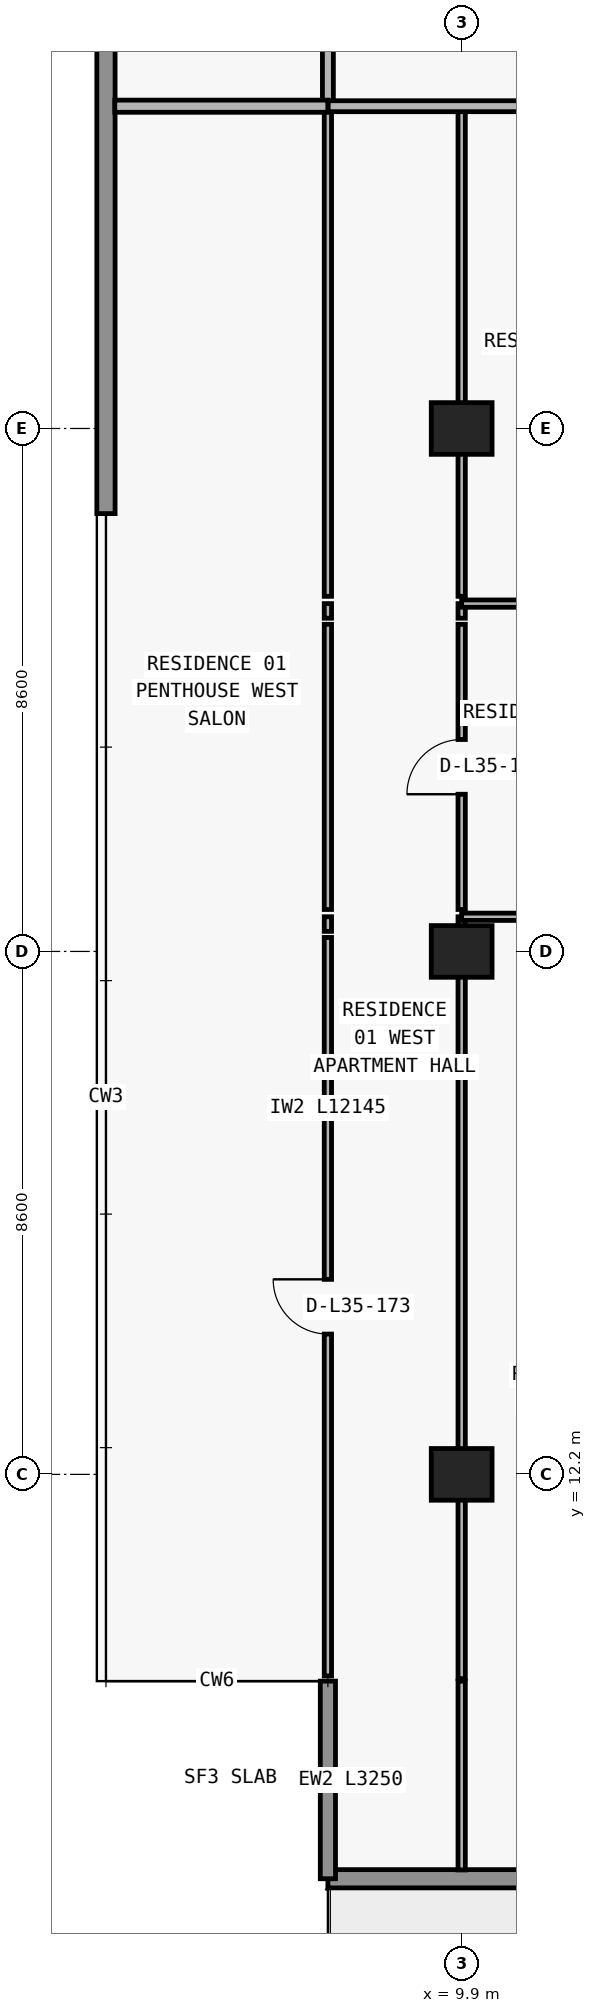
"""IFC4 building model, lengths in metres.
Left out: names, types, materials, properties, quantities, classifications, styles, units other than length and angle.
Written with IfcOpenShell. Run it as: python <this file> out.ifc"""

import sys

from ifc_helpers import new_model, si_unit, direction, frame, frame_2d, origin, origin_2d, place, context, subcontext, project, spatial, rectangle, extrude, element, fill, save


model = new_model("IFC4")
c1 = context("Model", 3, precision=1e-05, world=origin(), true_north=direction((0.0, 1.0)))
c2 = subcontext(c1, "Body", "Model", "MODEL_VIEW")
j1 = project(units=[si_unit("LENGTHUNIT", "METRE"), si_unit("PLANEANGLEUNIT", "RADIAN")], contexts=[c1])
p1 = place(None, origin())
s1 = spatial("IfcSite", under=j1, at=p1, CompositionType="ELEMENT")
p2 = place(p1, origin())
s2 = spatial("IfcBuilding", under=s1, at=p2, CompositionType="ELEMENT")
p3 = place(p2, frame((0.0, 0.0, 129.0)))
s3 = spatial("IfcBuildingStorey", under=s2, at=p3, CompositionType="ELEMENT", Elevation=129.0)
for number, where, z_axis, x_axis in (
    (1, (9.9, 12.2, 0.0), (0.0, 0.0, 1.0), (1.0, 0.0, 0.0)),
    (2, (9.9, 20.8, 0.0), (0.0, 0.0, 1.0), (1.0, 0.0, 0.0)),
    (3, (9.9, 29.4, 0.0), (0.0, 0.0, 1.0), (1.0, 0.0, 0.0)),
):
    element("IfcColumn", number, at=place(p3, frame(where, z_axis=z_axis, x_axis=x_axis)), inside=s3, PredefinedType="COLUMN", context=c2, shape_type="SweptSolid", body=[
        extrude(rectangle(XDim=1.0, YDim=0.85, at=origin_2d()), origin(), (0.0, 0.0, 1.0), 3.05),
    ])
p4 = place(p3, frame((70.1, 5.55, 0.0), z_axis=(0.0, 0.0, 1.0), x_axis=(-1.0, 0.0, 0.0)))
e4 = element("IfcWall", 4, at=p4, inside=s3, PredefinedType="STANDARD", context=c2, shape_type="SweptSolid", body=[
    extrude(rectangle(XDim=62.4, YDim=0.3, at=frame_2d((31.2, 0.0))), origin(), (0.0, 0.0, 1.0), 3.05),
])
p5 = place(p4, frame((57.226, 0.0, 0.0)))
e5 = element("IfcOpeningElement", 5, at=p5, cuts=e4, PredefinedType="OPENING", context=c2, shape_type="SweptSolid", body=[
    extrude(rectangle(XDim=2.0, YDim=2.3, at=frame_2d((1.0, 1.15))), frame((0.0, 0.16, 0.0), z_axis=(0.0, -1.0, 0.0), x_axis=(1.0, 0.0, 0.0)), (0.0, 0.0, 1.0), 0.32),
])
p6 = place(p4, frame((52.926, 0.0, 0.85)))
e6 = element("IfcOpeningElement", 6, at=p6, cuts=e4, PredefinedType="OPENING", context=c2, shape_type="SweptSolid", body=[
    extrude(rectangle(XDim=2.2, YDim=1.55, at=frame_2d((1.1, 0.775))), frame((0.0, 0.16, 0.0), z_axis=(0.0, -1.0, 0.0), x_axis=(1.0, 0.0, 0.0)), (0.0, 0.0, 1.0), 0.32),
])
p7 = place(p4, frame((48.49, 0.0, 0.0)))
e7 = element("IfcOpeningElement", 7, at=p7, cuts=e4, PredefinedType="OPENING", context=c2, shape_type="SweptSolid", body=[
    extrude(rectangle(XDim=2.0, YDim=2.3, at=frame_2d((1.0, 1.15))), frame((0.0, 0.16, 0.0), z_axis=(0.0, -1.0, 0.0), x_axis=(1.0, 0.0, 0.0)), (0.0, 0.0, 1.0), 0.32),
])
p8 = place(p4, frame((44.39, 0.0, 0.85)))
e8 = element("IfcOpeningElement", 8, at=p8, cuts=e4, PredefinedType="OPENING", context=c2, shape_type="SweptSolid", body=[
    extrude(rectangle(XDim=1.8, YDim=1.55, at=frame_2d((0.9, 0.775))), frame((0.0, 0.16, 0.0), z_axis=(0.0, -1.0, 0.0), x_axis=(1.0, 0.0, 0.0)), (0.0, 0.0, 1.0), 0.32),
])
p9 = place(p4, frame((40.426, 0.0, 0.0)))
e9 = element("IfcOpeningElement", 9, at=p9, cuts=e4, PredefinedType="OPENING", context=c2, shape_type="SweptSolid", body=[
    extrude(rectangle(XDim=2.0, YDim=2.3, at=frame_2d((1.0, 1.15))), frame((0.0, 0.16, 0.0), z_axis=(0.0, -1.0, 0.0), x_axis=(1.0, 0.0, 0.0)), (0.0, 0.0, 1.0), 0.32),
])
p10 = place(p4, frame((36.126, 0.0, 0.85)))
e10 = element("IfcOpeningElement", 10, at=p10, cuts=e4, PredefinedType="OPENING", context=c2, shape_type="SweptSolid", body=[
    extrude(rectangle(XDim=2.2, YDim=1.55, at=frame_2d((1.1, 0.775))), frame((0.0, 0.16, 0.0), z_axis=(0.0, -1.0, 0.0), x_axis=(1.0, 0.0, 0.0)), (0.0, 0.0, 1.0), 0.32),
])
p11 = place(p4, frame((31.91, 0.0, 0.0)))
e11 = element("IfcOpeningElement", 11, at=p11, cuts=e4, PredefinedType="OPENING", context=c2, shape_type="SweptSolid", body=[
    extrude(rectangle(XDim=2.0, YDim=2.3, at=frame_2d((1.0, 1.15))), frame((0.0, 0.16, 0.0), z_axis=(0.0, -1.0, 0.0), x_axis=(1.0, 0.0, 0.0)), (0.0, 0.0, 1.0), 0.32),
])
p12 = place(p4, frame((28.21, 0.0, 0.85)))
e12 = element("IfcOpeningElement", 12, at=p12, cuts=e4, PredefinedType="OPENING", context=c2, shape_type="SweptSolid", body=[
    extrude(rectangle(XDim=1.8, YDim=1.55, at=frame_2d((0.9, 0.775))), frame((0.0, 0.16, 0.0), z_axis=(0.0, -1.0, 0.0), x_axis=(1.0, 0.0, 0.0)), (0.0, 0.0, 1.0), 0.32),
])
p13 = place(p4, frame((24.426, 0.0, 0.0)))
e13 = element("IfcOpeningElement", 13, at=p13, cuts=e4, PredefinedType="OPENING", context=c2, shape_type="SweptSolid", body=[
    extrude(rectangle(XDim=2.0, YDim=2.3, at=frame_2d((1.0, 1.15))), frame((0.0, 0.16, 0.0), z_axis=(0.0, -1.0, 0.0), x_axis=(1.0, 0.0, 0.0)), (0.0, 0.0, 1.0), 0.32),
])
p14 = place(p4, frame((20.126, 0.0, 0.85)))
e14 = element("IfcOpeningElement", 14, at=p14, cuts=e4, PredefinedType="OPENING", context=c2, shape_type="SweptSolid", body=[
    extrude(rectangle(XDim=2.2, YDim=1.55, at=frame_2d((1.1, 0.775))), frame((0.0, 0.16, 0.0), z_axis=(0.0, -1.0, 0.0), x_axis=(1.0, 0.0, 0.0)), (0.0, 0.0, 1.0), 0.32),
])
p15 = place(p4, frame((15.69, 0.0, 0.0)))
e15 = element("IfcOpeningElement", 15, at=p15, cuts=e4, PredefinedType="OPENING", context=c2, shape_type="SweptSolid", body=[
    extrude(rectangle(XDim=2.0, YDim=2.3, at=frame_2d((1.0, 1.15))), frame((0.0, 0.16, 0.0), z_axis=(0.0, -1.0, 0.0), x_axis=(1.0, 0.0, 0.0)), (0.0, 0.0, 1.0), 0.32),
])
p16 = place(p4, frame((11.59, 0.0, 0.85)))
e16 = element("IfcOpeningElement", 16, at=p16, cuts=e4, PredefinedType="OPENING", context=c2, shape_type="SweptSolid", body=[
    extrude(rectangle(XDim=1.8, YDim=1.55, at=frame_2d((0.9, 0.775))), frame((0.0, 0.16, 0.0), z_axis=(0.0, -1.0, 0.0), x_axis=(1.0, 0.0, 0.0)), (0.0, 0.0, 1.0), 0.32),
])
p17 = place(p4, frame((7.626, 0.0, 0.0)))
e17 = element("IfcOpeningElement", 17, at=p17, cuts=e4, PredefinedType="OPENING", context=c2, shape_type="SweptSolid", body=[
    extrude(rectangle(XDim=2.0, YDim=2.3, at=frame_2d((1.0, 1.15))), frame((0.0, 0.16, 0.0), z_axis=(0.0, -1.0, 0.0), x_axis=(1.0, 0.0, 0.0)), (0.0, 0.0, 1.0), 0.32),
])
p18 = place(p4, frame((3.326, 0.0, 0.85)))
e18 = element("IfcOpeningElement", 18, at=p18, cuts=e4, PredefinedType="OPENING", context=c2, shape_type="SweptSolid", body=[
    extrude(rectangle(XDim=2.2, YDim=1.55, at=frame_2d((1.1, 0.775))), frame((0.0, 0.16, 0.0), z_axis=(0.0, -1.0, 0.0), x_axis=(1.0, 0.0, 0.0)), (0.0, 0.0, 1.0), 0.32),
])
p19 = place(p3, frame((7.7, 8.8, 0.0), z_axis=(0.0, 0.0, 1.0), x_axis=(0.0, -1.0, 0.0)))
e19 = element("IfcWall", 19, at=p19, inside=s3, PredefinedType="ELEMENTEDWALL", context=c2, shape_type="SweptSolid", body=[
    extrude(rectangle(XDim=3.25, YDim=0.25, at=frame_2d((1.625, 0.0))), origin(), (0.0, 0.0, 1.0), 3.05),
])
p20 = place(p3, frame((4.05, 28.0, 0.0), z_axis=(0.0, 0.0, 1.0), x_axis=(0.0, 1.0, 0.0)))
e20 = element("IfcWall", 20, at=p20, inside=s3, PredefinedType="STANDARD", context=c2, shape_type="SweptSolid", body=[
    extrude(rectangle(XDim=19.2, YDim=0.3, at=frame_2d((9.6, 0.0))), origin(), (0.0, 0.0, 1.0), 3.05),
])
p21 = place(p3, frame((7.7, 8.885, 0.0), z_axis=(0.0, 0.0, 1.0), x_axis=(0.0, 1.0, 0.0)))
e21 = element("IfcWall", 21, at=p21, inside=s3, PredefinedType="PARTITIONING", context=c2, shape_type="SweptSolid", body=[
    extrude(rectangle(XDim=12.145, YDim=0.12, at=frame_2d((6.073, 0.0))), origin(), (0.0, 0.0, 1.0), 3.05),
])
p22 = place(p21, frame((5.623, 0.0, 0.0)))
e22 = element("IfcOpeningElement", 22, at=p22, cuts=e21, PredefinedType="OPENING", context=c2, shape_type="SweptSolid", body=[
    extrude(rectangle(XDim=0.9, YDim=2.15, at=frame_2d((0.45, 1.075))), frame((0.0, 0.07, 0.0), z_axis=(0.0, -1.0, 0.0), x_axis=(1.0, 0.0, 0.0)), (0.0, 0.0, 1.0), 0.14),
])
p23 = place(p3, frame((7.7, 21.13, 0.0), z_axis=(0.0, 0.0, 1.0), x_axis=(0.0, 1.0, 0.0)))
e23 = element("IfcWall", 23, at=p23, inside=s3, PredefinedType="PARTITIONING", context=c2, shape_type="SweptSolid", body=[
    extrude(rectangle(XDim=0.24, YDim=0.12, at=frame_2d((0.12, 0.0))), origin(), (0.0, 0.0, 1.0), 3.05),
])
p24 = place(p3, frame((7.7, 21.49, 0.0), z_axis=(0.0, 0.0, 1.0), x_axis=(0.0, 1.0, 0.0)))
e24 = element("IfcWall", 24, at=p24, inside=s3, PredefinedType="PARTITIONING", context=c2, shape_type="SweptSolid", body=[
    extrude(rectangle(XDim=4.69, YDim=0.12, at=frame_2d((2.345, 0.0))), origin(), (0.0, 0.0, 1.0), 3.05),
])
p25 = place(p3, frame((7.7, 26.28, 0.0), z_axis=(0.0, 0.0, 1.0), x_axis=(0.0, 1.0, 0.0)))
e25 = element("IfcWall", 25, at=p25, inside=s3, PredefinedType="PARTITIONING", context=c2, shape_type="SweptSolid", body=[
    extrude(rectangle(XDim=0.24, YDim=0.12, at=frame_2d((0.12, 0.0))), origin(), (0.0, 0.0, 1.0), 3.05),
])
p26 = place(p3, frame((7.7, 26.64, 0.0), z_axis=(0.0, 0.0, 1.0), x_axis=(0.0, 1.0, 0.0)))
e26 = element("IfcWall", 26, at=p26, inside=s3, PredefinedType="PARTITIONING", context=c2, shape_type="SweptSolid", body=[
    extrude(rectangle(XDim=8.06, YDim=0.12, at=frame_2d((4.03, 0.0))), origin(), (0.0, 0.0, 1.0), 3.05),
])
p27 = place(p3, frame((7.7, 34.705, 0.0), z_axis=(0.0, 0.0, 1.0), x_axis=(0.0, 1.0, 0.0)))
e27 = element("IfcWall", 27, at=p27, inside=s3, PredefinedType="PARTITIONING", context=c2, shape_type="SweptSolid", body=[
    extrude(rectangle(XDim=2.245, YDim=0.18, at=frame_2d((1.123, 0.0))), origin(), (0.0, 0.0, 1.0), 3.05),
])
p28 = place(p3, frame((9.9, 5.695, 0.0), z_axis=(0.0, 0.0, 1.0), x_axis=(0.0, 1.0, 0.0)))
e28 = element("IfcWall", 28, at=p28, inside=s3, PredefinedType="PARTITIONING", context=c2, shape_type="SweptSolid", body=[
    extrude(rectangle(XDim=3.105, YDim=0.12, at=frame_2d((1.552, 0.0))), origin(), (0.0, 0.0, 1.0), 3.05),
])
p29 = place(p3, frame((9.9, 8.84, 0.0), z_axis=(0.0, 0.0, 1.0), x_axis=(0.0, 1.0, 0.0)))
e29 = element("IfcWall", 29, at=p29, inside=s3, PredefinedType="PARTITIONING", context=c2, shape_type="SweptSolid", body=[
    extrude(rectangle(XDim=12.19, YDim=0.12, at=frame_2d((6.095, 0.0))), origin(), (0.0, 0.0, 1.0), 2.174),
])
p30 = place(p3, frame((9.9, 21.13, 0.0), z_axis=(0.0, 0.0, 1.0), x_axis=(0.0, 1.0, 0.0)))
e30 = element("IfcWall", 30, at=p30, inside=s3, PredefinedType="PARTITIONING", context=c2, shape_type="SweptSolid", body=[
    extrude(rectangle(XDim=0.24, YDim=0.12, at=frame_2d((0.12, 0.0))), origin(), (0.0, 0.0, 1.0), 2.174),
])
p31 = place(p3, frame((9.9, 21.49, 0.0), z_axis=(0.0, 0.0, 1.0), x_axis=(0.0, 1.0, 0.0)))
e31 = element("IfcWall", 31, at=p31, inside=s3, PredefinedType="PARTITIONING", context=c2, shape_type="SweptSolid", body=[
    extrude(rectangle(XDim=4.69, YDim=0.12, at=frame_2d((2.345, 0.0))), origin(), (0.0, 0.0, 1.0), 2.174),
])
p32 = place(p31, frame((1.895, 0.0, 0.0)))
e32 = element("IfcOpeningElement", 32, at=p32, cuts=e31, PredefinedType="OPENING", context=c2, shape_type="SweptSolid", body=[
    extrude(rectangle(XDim=0.9, YDim=2.124, at=frame_2d((0.45, 1.062))), frame((0.0, 0.07, 0.0), z_axis=(0.0, -1.0, 0.0), x_axis=(1.0, 0.0, 0.0)), (0.0, 0.0, 1.0), 0.14),
])
p33 = place(p3, frame((9.9, 26.28, 0.0), z_axis=(0.0, 0.0, 1.0), x_axis=(0.0, 1.0, 0.0)))
e33 = element("IfcWall", 33, at=p33, inside=s3, PredefinedType="PARTITIONING", context=c2, shape_type="SweptSolid", body=[
    extrude(rectangle(XDim=0.24, YDim=0.12, at=frame_2d((0.12, 0.0))), origin(), (0.0, 0.0, 1.0), 2.174),
])
p34 = place(p3, frame((9.9, 26.64, 0.0), z_axis=(0.0, 0.0, 1.0), x_axis=(0.0, 1.0, 0.0)))
e34 = element("IfcWall", 34, at=p34, inside=s3, PredefinedType="PARTITIONING", context=c2, shape_type="SweptSolid", body=[
    extrude(rectangle(XDim=8.06, YDim=0.12, at=frame_2d((4.03, 0.0))), origin(), (0.0, 0.0, 1.0), 2.174),
])
p35 = place(p3, frame((9.9, 21.37, 0.0), z_axis=(0.0, 0.0, 1.0), x_axis=(1.0, 0.0, 0.0)))
e35 = element("IfcWall", 35, at=p35, inside=s3, PredefinedType="PARTITIONING", context=c2, shape_type="SweptSolid", body=[
    extrude(rectangle(XDim=8.35, YDim=0.12, at=frame_2d((4.175, 0.0))), origin(), (0.0, 0.0, 1.0), 3.05),
])
p36 = place(p35, frame((1.524, 0.0, 0.0)))
e36 = element("IfcOpeningElement", 36, at=p36, cuts=e35, PredefinedType="OPENING", context=c2, shape_type="SweptSolid", body=[
    extrude(rectangle(XDim=0.9, YDim=2.15, at=frame_2d((0.45, 1.075))), frame((0.0, 0.07, 0.0), z_axis=(0.0, -1.0, 0.0), x_axis=(1.0, 0.0, 0.0)), (0.0, 0.0, 1.0), 0.14),
])
p37 = place(p35, frame((6.118, 0.0, 0.0)))
e37 = element("IfcOpeningElement", 37, at=p37, cuts=e35, PredefinedType="OPENING", context=c2, shape_type="SweptSolid", body=[
    extrude(rectangle(XDim=0.9, YDim=2.15, at=frame_2d((0.45, 1.075))), frame((0.0, 0.07, 0.0), z_axis=(0.0, -1.0, 0.0), x_axis=(1.0, 0.0, 0.0)), (0.0, 0.0, 1.0), 0.14),
])
p38 = place(p3, frame((9.9, 26.52, 0.0), z_axis=(0.0, 0.0, 1.0), x_axis=(1.0, 0.0, 0.0)))
e38 = element("IfcWall", 38, at=p38, inside=s3, PredefinedType="PARTITIONING", context=c2, shape_type="SweptSolid", body=[
    extrude(rectangle(XDim=8.35, YDim=0.12, at=frame_2d((4.175, 0.0))), origin(), (0.0, 0.0, 1.0), 3.05),
])
p39 = place(p38, frame((1.943, 0.0, 0.0)))
e39 = element("IfcOpeningElement", 39, at=p39, cuts=e38, PredefinedType="OPENING", context=c2, shape_type="SweptSolid", body=[
    extrude(rectangle(XDim=0.9, YDim=2.15, at=frame_2d((0.45, 1.075))), frame((0.0, 0.07, 0.0), z_axis=(0.0, -1.0, 0.0), x_axis=(1.0, 0.0, 0.0)), (0.0, 0.0, 1.0), 0.14),
])
p40 = place(p3, frame((4.195, 34.7, 0.0), z_axis=(0.0, 0.0, 1.0), x_axis=(1.0, 0.0, 0.0)))
e40 = element("IfcWall", 40, at=p40, inside=s3, PredefinedType="PARTITIONING", context=c2, shape_type="SweptSolid", body=[
    extrude(rectangle(XDim=3.505, YDim=0.2, at=frame_2d((1.752, 0.0))), origin(), (0.0, 0.0, 1.0), 3.05),
])
p41 = place(p3, frame((7.705, 34.7, 0.0), z_axis=(0.0, 0.0, 1.0), x_axis=(1.0, 0.0, 0.0)))
e41 = element("IfcWall", 41, at=p41, inside=s3, PredefinedType="PARTITIONING", context=c2, shape_type="SweptSolid", body=[
    extrude(rectangle(XDim=10.545, YDim=0.18, at=frame_2d((5.272, 0.0))), origin(), (0.0, 0.0, 1.0), 3.05),
])
p42 = place(p41, frame((5.07, 0.0, 0.0)))
e42 = element("IfcOpeningElement", 42, at=p42, cuts=e41, PredefinedType="OPENING", context=c2, shape_type="SweptSolid", body=[
    extrude(rectangle(XDim=1.0, YDim=2.2, at=frame_2d((0.5, 1.1))), frame((0.0, 0.1, 0.0), z_axis=(0.0, -1.0, 0.0), x_axis=(1.0, 0.0, 0.0)), (0.0, 0.0, 1.0), 0.2),
])
p43 = place(p32, origin())
e43 = element("IfcDoor", 43, at=p43, inside=s3, OperationType="SINGLE_SWING_LEFT", PredefinedType="DOOR", context=c2, shape_type="SweptSolid", body=[
    extrude(rectangle(XDim=0.9, YDim=2.124, at=frame_2d((0.45, 1.062))), frame((0.0, 0.025, 0.0), z_axis=(0.0, -1.0, 0.0), x_axis=(1.0, 0.0, 0.0)), (0.0, 0.0, 1.0), 0.05),
])
fill(e32, e43)
p44 = place(p22, origin())
e44 = element("IfcDoor", 44, at=p44, inside=s3, OperationType="SINGLE_SWING_RIGHT", PredefinedType="DOOR", context=c2, shape_type="SweptSolid", body=[
    extrude(rectangle(XDim=0.9, YDim=2.15, at=frame_2d((0.45, 1.075))), frame((0.0, 0.025, 0.0), z_axis=(0.0, -1.0, 0.0), x_axis=(1.0, 0.0, 0.0)), (0.0, 0.0, 1.0), 0.05),
])
fill(e22, e44)
save(model, sys.argv[1])
